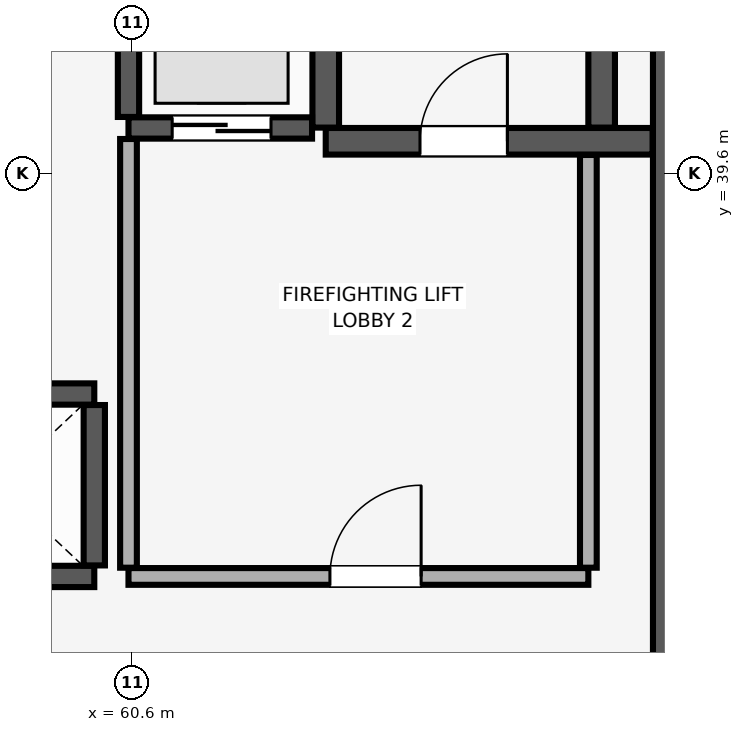
"""IFC4 building model, lengths in metres.
Left out: names, types, materials, properties, quantities, classifications, styles, units other than length and angle.
Written with IfcOpenShell. Run it as: python <this file> out.ifc"""

import sys

from ifc_helpers import new_model, si_unit, direction, frame, frame_2d, origin, place, context, subcontext, project, spatial, rectangle, extrude, element, fill, save


model = new_model("IFC4")
c1 = context("Model", 3, precision=1e-05, world=origin(), true_north=direction((0.0, 1.0)))
c2 = subcontext(c1, "Body", "Model", "MODEL_VIEW")
j1 = project(units=[si_unit("LENGTHUNIT", "METRE"), si_unit("PLANEANGLEUNIT", "RADIAN")], contexts=[c1])
p1 = place(None, origin())
s1 = spatial("IfcSite", under=j1, at=p1, CompositionType="ELEMENT")
p2 = place(p1, origin())
s2 = spatial("IfcBuilding", under=s1, at=p2, CompositionType="ELEMENT")
p3 = place(p2, frame((0.0, 0.0, 276.55)))
s3 = spatial("IfcBuildingStorey", under=s2, at=p3, CompositionType="ELEMENT", Elevation=276.55)
p4 = place(p3, frame((67.8, 29.4, 0.0), z_axis=(0.0, 0.0, 1.0), x_axis=(0.0, 1.0, 0.0)))
e1 = element("IfcWall", 1, at=p4, inside=s3, PredefinedType="SHEAR", context=c2, shape_type="SweptSolid", body=[
    extrude(rectangle(XDim=19.2, YDim=0.7, at=frame_2d((9.6, 0.0))), origin(), (0.0, 0.0, 1.0), 3.6),
])
p5 = place(p3, frame((63.145, 40.025, 0.0), z_axis=(0.0, 0.0, 1.0), x_axis=(1.0, 0.0, 0.0)))
e2 = element("IfcWall", 2, at=p5, inside=s3, PredefinedType="SHEAR", context=c2, shape_type="SweptSolid", body=[
    extrude(rectangle(XDim=4.3, YDim=0.35, at=frame_2d((2.15, 0.0))), origin(), (0.0, 0.0, 1.0), 3.6),
])
p6 = place(p5, frame((1.24, 0.0, 0.0)))
e3 = element("IfcOpeningElement", 3, at=p6, cuts=e2, PredefinedType="OPENING", context=c2, shape_type="SweptSolid", body=[
    extrude(rectangle(XDim=1.15, YDim=2.15, at=frame_2d((0.575, 1.075))), frame((0.0, 0.185, 0.0), z_axis=(0.0, -1.0, 0.0), x_axis=(1.0, 0.0, 0.0)), (0.0, 0.0, 1.0), 0.37),
])
for number, where, z_axis, x_axis in (
    (4, (63.145, 40.205, 0.0), (0.0, 0.0, 1.0), (0.0, 1.0, 0.0)),
    (5, (66.775, 40.205, 0.0), (0.0, 0.0, 1.0), (0.0, 1.0, 0.0)),
):
    element("IfcWall", number, at=place(p3, frame(where, z_axis=z_axis, x_axis=x_axis)), inside=s3, PredefinedType="SHEAR", context=c2, shape_type="SweptSolid", body=[
        extrude(rectangle(XDim=8.09, YDim=0.35, at=frame_2d((4.045, 0.0))), origin(), (0.0, 0.0, 1.0), 3.6),
    ])
for number, where, z_axis, x_axis in (
    (6, (57.55, 34.3, 0.0), (0.0, 0.0, 1.0), (1.0, 0.0, 0.0)),
    (7, (57.55, 36.7, 0.0), (0.0, 0.0, 1.0), (1.0, 0.0, 0.0)),
):
    element("IfcWall", number, at=place(p3, frame(where, z_axis=z_axis, x_axis=x_axis)), inside=s3, PredefinedType="SHEAR", context=c2, shape_type="SweptSolid", body=[
        extrude(rectangle(XDim=2.55, YDim=0.28, at=frame_2d((1.275, 0.0))), origin(), (0.0, 0.0, 1.0), 3.6),
    ])
p7 = place(p3, frame((60.1, 34.445, 0.0), z_axis=(0.0, 0.0, 1.0), x_axis=(0.0, 1.0, 0.0)))
e8 = element("IfcWall", 8, at=p7, inside=s3, PredefinedType="SHEAR", context=c2, shape_type="SweptSolid", body=[
    extrude(rectangle(XDim=2.11, YDim=0.28, at=frame_2d((1.055, 0.0))), origin(), (0.0, 0.0, 1.0), 3.6),
])
p8 = place(p3, frame((60.55, 40.2, 0.0), z_axis=(0.0, 0.0, 1.0), x_axis=(1.0, 0.0, 0.0)))
e9 = element("IfcWall", 9, at=p8, inside=s3, PredefinedType="SHEAR", context=c2, shape_type="SweptSolid", body=[
    extrude(rectangle(XDim=2.415, YDim=0.28, at=frame_2d((1.208, 0.0))), origin(), (0.0, 0.0, 1.0), 3.6),
])
p9 = place(p8, frame((0.575, 0.0, 0.0)))
e10 = element("IfcOpeningElement", 10, at=p9, cuts=e9, PredefinedType="OPENING", context=c2, shape_type="SweptSolid", body=[
    extrude(rectangle(XDim=1.3, YDim=2.3, at=frame_2d((0.65, 1.15))), frame((0.0, 0.15, 0.0), z_axis=(0.0, -1.0, 0.0), x_axis=(1.0, 0.0, 0.0)), (0.0, 0.0, 1.0), 0.3),
])
p10 = place(p3, frame((60.55, 40.345, 0.0), z_axis=(0.0, 0.0, 1.0), x_axis=(0.0, 1.0, 0.0)))
e11 = element("IfcWall", 11, at=p10, inside=s3, PredefinedType="SHEAR", context=c2, shape_type="SweptSolid", body=[
    extrude(rectangle(XDim=2.81, YDim=0.28, at=frame_2d((1.405, 0.0))), origin(), (0.0, 0.0, 1.0), 3.6),
])
p11 = place(p3, frame((60.55, 34.3, 0.0), z_axis=(0.0, 0.0, 1.0), x_axis=(1.0, 0.0, 0.0)))
e12 = element("IfcWall", 12, at=p11, inside=s3, PredefinedType="PARTITIONING", context=c2, shape_type="SweptSolid", body=[
    extrude(rectangle(XDim=6.05, YDim=0.22, at=frame_2d((3.025, 0.0))), origin(), (0.0, 0.0, 1.0), 3.6),
])
p12 = place(p11, frame((2.65, 0.0, 0.0)))
e13 = element("IfcOpeningElement", 13, at=p12, cuts=e12, PredefinedType="OPENING", context=c2, shape_type="SweptSolid", body=[
    extrude(rectangle(XDim=1.2, YDim=2.15, at=frame_2d((0.6, 1.075))), frame((0.0, 0.12, 0.0), z_axis=(0.0, -1.0, 0.0), x_axis=(1.0, 0.0, 0.0)), (0.0, 0.0, 1.0), 0.24),
])
p13 = place(p3, frame((60.55, 34.415, 0.0), z_axis=(0.0, 0.0, 1.0), x_axis=(0.0, 1.0, 0.0)))
e14 = element("IfcWall", 14, at=p13, inside=s3, PredefinedType="PARTITIONING", context=c2, shape_type="SweptSolid", body=[
    extrude(rectangle(XDim=5.64, YDim=0.22, at=frame_2d((2.82, 0.0))), origin(), (0.0, 0.0, 1.0), 3.6),
])
p14 = place(p3, frame((66.6, 34.415, 0.0), z_axis=(0.0, 0.0, 1.0), x_axis=(0.0, 1.0, 0.0)))
e15 = element("IfcWall", 15, at=p14, inside=s3, PredefinedType="PARTITIONING", context=c2, shape_type="SweptSolid", body=[
    extrude(rectangle(XDim=5.43, YDim=0.22, at=frame_2d((2.715, 0.0))), origin(), (0.0, 0.0, 1.0), 3.6),
])
p15 = place(p6, origin())
e16 = element("IfcDoor", 16, at=p15, inside=s3, OperationType="SINGLE_SWING_RIGHT", PredefinedType="DOOR", context=c2, shape_type="SweptSolid", body=[
    extrude(rectangle(XDim=1.15, YDim=2.15, at=frame_2d((0.575, 1.075))), frame((0.0, 0.025, 0.0), z_axis=(0.0, -1.0, 0.0), x_axis=(1.0, 0.0, 0.0)), (0.0, 0.0, 1.0), 0.05),
])
fill(e3, e16)
p16 = place(p9, origin())
e17 = element("IfcDoor", 17, at=p16, inside=s3, OperationType="DOUBLE_DOOR_SLIDING", PredefinedType="DOOR", context=c2, shape_type="SweptSolid", body=[
    extrude(rectangle(XDim=1.3, YDim=2.3, at=frame_2d((0.65, 1.15))), frame((0.0, 0.025, 0.0), z_axis=(0.0, -1.0, 0.0), x_axis=(1.0, 0.0, 0.0)), (0.0, 0.0, 1.0), 0.05),
])
fill(e10, e17)
p17 = place(p12, origin())
e18 = element("IfcDoor", 18, at=p17, inside=s3, OperationType="SINGLE_SWING_RIGHT", PredefinedType="DOOR", context=c2, shape_type="SweptSolid", body=[
    extrude(rectangle(XDim=1.2, YDim=2.15, at=frame_2d((0.6, 1.075))), frame((0.0, 0.025, 0.0), z_axis=(0.0, -1.0, 0.0), x_axis=(1.0, 0.0, 0.0)), (0.0, 0.0, 1.0), 0.05),
])
fill(e13, e18)
save(model, sys.argv[1])
